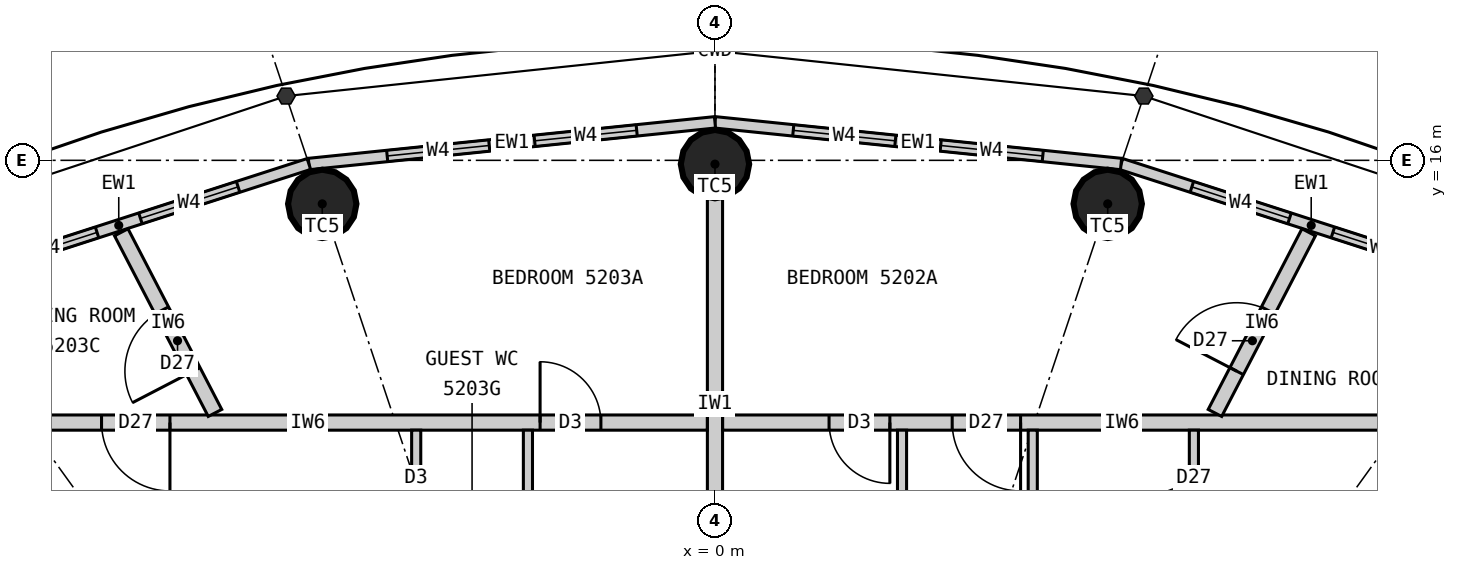
"""IFC4 building model, lengths in metres.
Left out: names, types, materials, properties, quantities, classifications, styles, units other than length and angle.
Written with IfcOpenShell. Run it as: python <this file> out.ifc"""

import sys

from ifc_helpers import new_model, si_unit, direction, frame, frame_2d, origin, origin_2d, place, context, subcontext, project, spatial, rectangle, circle, extrude, element, fill, save


model = new_model("IFC4")
c1 = context("Model", 3, precision=1e-05, world=origin(), true_north=direction((0.0, 1.0)))
c2 = subcontext(c1, "Body", "Model", "MODEL_VIEW")
j1 = project(units=[si_unit("LENGTHUNIT", "METRE"), si_unit("PLANEANGLEUNIT", "RADIAN")], contexts=[c1])
p1 = place(None, origin())
s1 = spatial("IfcSite", under=j1, at=p1, CompositionType="ELEMENT")
p2 = place(p1, origin())
s2 = spatial("IfcBuilding", under=s1, at=p2, CompositionType="ELEMENT")
p3 = place(p2, frame((0.0, 0.0, 196.2)))
s3 = spatial("IfcBuildingStorey", under=s2, at=p3, CompositionType="ELEMENT", Elevation=196.2)
for number, where, z_axis, x_axis in (
    (1, (5.167, 15.427, 0.0), (0.0, 0.0, 1.0), (1.0, 0.0, 0.0)),
    (2, (0.0, 15.95, 0.0), (0.0, 0.0, 1.0), (1.0, 0.0, 0.0)),
    (3, (-5.167, 15.427, 0.0), (0.0, 0.0, 1.0), (1.0, 0.0, 0.0)),
):
    element("IfcColumn", number, at=place(p3, frame(where, z_axis=z_axis, x_axis=x_axis)), inside=s3, PredefinedType="COLUMN", context=c2, shape_type="SweptSolid", body=[
        extrude(circle(Radius=0.45, at=origin_2d()), origin(), (0.0, 0.0, 1.0), 3.3),
    ])
p4 = place(p3, frame((10.346, 14.336, 0.0), z_axis=(0.0, 0.0, 1.0), x_axis=(-0.951644702515, 0.307200846638, 0.0)))
e4 = element("IfcWall", 4, at=p4, inside=s3, PredefinedType="ELEMENTEDWALL", context=c2, shape_type="SweptSolid", body=[
    extrude(rectangle(XDim=5.258, YDim=0.15, at=frame_2d((2.629, 0.0))), origin(), (0.0, 0.0, 1.0), 3.12),
])
p5 = place(p4, frame((0.979, 0.0, 0.9)))
e5 = element("IfcOpeningElement", 5, at=p5, cuts=e4, PredefinedType="OPENING", context=c2, shape_type="SweptSolid", body=[
    extrude(rectangle(XDim=1.35, YDim=1.9, at=frame_2d((0.675, 0.95))), frame((0.0, 0.085, 0.0), z_axis=(0.0, -1.0, 0.0), x_axis=(1.0, 0.0, 0.0)), (0.0, 0.0, 1.0), 0.17),
])
p6 = place(p4, frame((2.929, 0.0, 0.9)))
e6 = element("IfcOpeningElement", 6, at=p6, cuts=e4, PredefinedType="OPENING", context=c2, shape_type="SweptSolid", body=[
    extrude(rectangle(XDim=1.35, YDim=1.9, at=frame_2d((0.675, 0.95))), frame((0.0, 0.085, 0.0), z_axis=(0.0, -1.0, 0.0), x_axis=(1.0, 0.0, 0.0)), (0.0, 0.0, 1.0), 0.17),
])
p7 = place(p3, frame((5.343, 15.952, 0.0), z_axis=(0.0, 0.0, 1.0), x_axis=(-0.994774574972, 0.102095763818, 0.0)))
e7 = element("IfcWall", 7, at=p7, inside=s3, PredefinedType="ELEMENTEDWALL", context=c2, shape_type="SweptSolid", body=[
    extrude(rectangle(XDim=5.371, YDim=0.15, at=frame_2d((2.686, 0.0))), origin(), (0.0, 0.0, 1.0), 3.12),
])
p8 = place(p7, frame((1.035, 0.0, 0.9)))
e8 = element("IfcOpeningElement", 8, at=p8, cuts=e7, PredefinedType="OPENING", context=c2, shape_type="SweptSolid", body=[
    extrude(rectangle(XDim=1.35, YDim=1.9, at=frame_2d((0.675, 0.95))), frame((0.0, 0.085, 0.0), z_axis=(0.0, -1.0, 0.0), x_axis=(1.0, 0.0, 0.0)), (0.0, 0.0, 1.0), 0.17),
])
p9 = place(p7, frame((2.985, 0.0, 0.9)))
e9 = element("IfcOpeningElement", 9, at=p9, cuts=e7, PredefinedType="OPENING", context=c2, shape_type="SweptSolid", body=[
    extrude(rectangle(XDim=1.35, YDim=1.9, at=frame_2d((0.675, 0.95))), frame((0.0, 0.085, 0.0), z_axis=(0.0, -1.0, 0.0), x_axis=(1.0, 0.0, 0.0)), (0.0, 0.0, 1.0), 0.17),
])
p10 = place(p3, frame((0.0, 16.5, 0.0), z_axis=(0.0, 0.0, 1.0), x_axis=(-0.994774574972, -0.102095763818, 0.0)))
e10 = element("IfcWall", 10, at=p10, inside=s3, PredefinedType="ELEMENTEDWALL", context=c2, shape_type="SweptSolid", body=[
    extrude(rectangle(XDim=5.371, YDim=0.15, at=frame_2d((2.686, 0.0))), origin(), (0.0, 0.0, 1.0), 3.12),
])
p11 = place(p10, frame((1.035, 0.0, 0.9)))
e11 = element("IfcOpeningElement", 11, at=p11, cuts=e10, PredefinedType="OPENING", context=c2, shape_type="SweptSolid", body=[
    extrude(rectangle(XDim=1.35, YDim=1.9, at=frame_2d((0.675, 0.95))), frame((0.0, 0.085, 0.0), z_axis=(0.0, -1.0, 0.0), x_axis=(1.0, 0.0, 0.0)), (0.0, 0.0, 1.0), 0.17),
])
p12 = place(p10, frame((2.985, 0.0, 0.9)))
e12 = element("IfcOpeningElement", 12, at=p12, cuts=e10, PredefinedType="OPENING", context=c2, shape_type="SweptSolid", body=[
    extrude(rectangle(XDim=1.35, YDim=1.9, at=frame_2d((0.675, 0.95))), frame((0.0, 0.085, 0.0), z_axis=(0.0, -1.0, 0.0), x_axis=(1.0, 0.0, 0.0)), (0.0, 0.0, 1.0), 0.17),
])
p13 = place(p3, frame((-5.343, 15.952, 0.0), z_axis=(0.0, 0.0, 1.0), x_axis=(-0.951644702515, -0.307200846638, 0.0)))
e13 = element("IfcWall", 13, at=p13, inside=s3, PredefinedType="ELEMENTEDWALL", context=c2, shape_type="SweptSolid", body=[
    extrude(rectangle(XDim=5.258, YDim=0.15, at=frame_2d((2.629, 0.0))), origin(), (0.0, 0.0, 1.0), 3.12),
])
p14 = place(p13, frame((0.979, 0.0, 0.9)))
e14 = element("IfcOpeningElement", 14, at=p14, cuts=e13, PredefinedType="OPENING", context=c2, shape_type="SweptSolid", body=[
    extrude(rectangle(XDim=1.35, YDim=1.9, at=frame_2d((0.675, 0.95))), frame((0.0, 0.085, 0.0), z_axis=(0.0, -1.0, 0.0), x_axis=(1.0, 0.0, 0.0)), (0.0, 0.0, 1.0), 0.17),
])
p15 = place(p13, frame((2.929, 0.0, 0.9)))
e15 = element("IfcOpeningElement", 15, at=p15, cuts=e13, PredefinedType="OPENING", context=c2, shape_type="SweptSolid", body=[
    extrude(rectangle(XDim=1.35, YDim=1.9, at=frame_2d((0.675, 0.95))), frame((0.0, 0.085, 0.0), z_axis=(0.0, -1.0, 0.0), x_axis=(1.0, 0.0, 0.0)), (0.0, 0.0, 1.0), 0.17),
])
p16 = place(p3, frame((0.0, 10.1, 0.0), z_axis=(0.0, 0.0, 1.0), x_axis=(0.0, 1.0, 0.0)))
e16 = element("IfcWall", 16, at=p16, inside=s3, PredefinedType="PARTITIONING", context=c2, shape_type="SweptSolid", body=[
    extrude(rectangle(XDim=5.4, YDim=0.2, at=frame_2d((2.7, 0.0))), origin(), (0.0, 0.0, 1.0), 2.42),
])
p17 = place(p3, frame((10.609, 12.55, 0.0), z_axis=(0.0, 0.0, 1.0), x_axis=(-1.0, 0.0, 0.0)))
e17 = element("IfcWall", 17, at=p17, inside=s3, PredefinedType="PARTITIONING", context=c2, shape_type="SweptSolid", body=[
    extrude(rectangle(XDim=10.508, YDim=0.2, at=frame_2d((5.254, 0.0))), origin(), (0.0, 0.0, 1.0), 3.12),
])
p18 = place(p17, frame((6.588, 0.0, 0.0)))
e18 = element("IfcOpeningElement", 18, at=p18, cuts=e17, PredefinedType="OPENING", context=c2, shape_type="SweptSolid", body=[
    extrude(rectangle(XDim=0.9, YDim=2.1, at=frame_2d((0.45, 1.05))), frame((0.0, 0.11, 0.0), z_axis=(0.0, -1.0, 0.0), x_axis=(1.0, 0.0, 0.0)), (0.0, 0.0, 1.0), 0.22),
])
p19 = place(p17, frame((8.308, 0.0, 0.0)))
e19 = element("IfcOpeningElement", 19, at=p19, cuts=e17, PredefinedType="OPENING", context=c2, shape_type="SweptSolid", body=[
    extrude(rectangle(XDim=0.8, YDim=2.1, at=frame_2d((0.4, 1.05))), frame((0.0, 0.11, 0.0), z_axis=(0.0, -1.0, 0.0), x_axis=(1.0, 0.0, 0.0)), (0.0, 0.0, 1.0), 0.22),
])
p20 = place(p3, frame((6.578, 12.677, 0.0), z_axis=(0.0, 0.0, 1.0), x_axis=(0.460620531465, 0.887597164255, 0.0)))
e20 = element("IfcWall", 20, at=p20, inside=s3, PredefinedType="PARTITIONING", context=c2, shape_type="SweptSolid", body=[
    extrude(rectangle(XDim=2.678, YDim=0.2, at=frame_2d((1.339, 0.0))), origin(), (0.0, 0.0, 1.0), 3.12),
])
p21 = place(p20, frame((0.62, 0.0, 0.0)))
e21 = element("IfcOpeningElement", 21, at=p21, cuts=e20, PredefinedType="OPENING", context=c2, shape_type="SweptSolid", body=[
    extrude(rectangle(XDim=0.9, YDim=2.1, at=frame_2d((0.45, 1.05))), frame((0.0, 0.11, 0.0), z_axis=(0.0, -1.0, 0.0), x_axis=(1.0, 0.0, 0.0)), (0.0, 0.0, 1.0), 0.22),
])
p22 = place(p3, frame((6.301, 10.1, 0.0), z_axis=(0.0, 0.0, 1.0), x_axis=(0.0, 1.0, 0.0)))
e22 = element("IfcWall", 22, at=p22, inside=s3, PredefinedType="PARTITIONING", context=c2, shape_type="SweptSolid", body=[
    extrude(rectangle(XDim=2.35, YDim=0.12, at=frame_2d((1.175, 0.0))), origin(), (0.0, 0.0, 1.0), 3.12),
])
p23 = place(p22, frame((0.72, 0.0, 0.0)))
e23 = element("IfcOpeningElement", 23, at=p23, cuts=e22, PredefinedType="OPENING", context=c2, shape_type="SweptSolid", body=[
    extrude(rectangle(XDim=0.9, YDim=2.1, at=frame_2d((0.45, 1.05))), frame((0.0, 0.07, 0.0), z_axis=(0.0, -1.0, 0.0), x_axis=(1.0, 0.0, 0.0)), (0.0, 0.0, 1.0), 0.14),
])
for number, where, z_axis, x_axis in (
    (24, (4.181, 10.1, 0.0), (0.0, 0.0, 1.0), (0.0, 1.0, 0.0)),
    (25, (2.461, 10.1, 0.0), (0.0, 0.0, 1.0), (0.0, 1.0, 0.0)),
):
    element("IfcWall", number, at=place(p3, frame(where, z_axis=z_axis, x_axis=x_axis)), inside=s3, PredefinedType="PARTITIONING", context=c2, shape_type="SweptSolid", body=[
        extrude(rectangle(XDim=2.35, YDim=0.12, at=frame_2d((1.175, 0.0))), origin(), (0.0, 0.0, 1.0), 3.12),
    ])
p24 = place(p3, frame((-0.101, 12.55, 0.0), z_axis=(0.0, 0.0, 1.0), x_axis=(-1.0, 0.0, 0.0)))
e26 = element("IfcWall", 26, at=p24, inside=s3, PredefinedType="PARTITIONING", context=c2, shape_type="SweptSolid", body=[
    extrude(rectangle(XDim=10.508, YDim=0.2, at=frame_2d((5.254, 0.0))), origin(), (0.0, 0.0, 1.0), 3.12),
])
p25 = place(p24, frame((1.4, 0.0, 0.0)))
e27 = element("IfcOpeningElement", 27, at=p25, cuts=e26, PredefinedType="OPENING", context=c2, shape_type="SweptSolid", body=[
    extrude(rectangle(XDim=0.8, YDim=2.1, at=frame_2d((0.4, 1.05))), frame((0.0, 0.11, 0.0), z_axis=(0.0, -1.0, 0.0), x_axis=(1.0, 0.0, 0.0)), (0.0, 0.0, 1.0), 0.22),
])
p26 = place(p24, frame((7.07, 0.0, 0.0)))
e28 = element("IfcOpeningElement", 28, at=p26, cuts=e26, PredefinedType="OPENING", context=c2, shape_type="SweptSolid", body=[
    extrude(rectangle(XDim=0.9, YDim=2.1, at=frame_2d((0.45, 1.05))), frame((0.0, 0.11, 0.0), z_axis=(0.0, -1.0, 0.0), x_axis=(1.0, 0.0, 0.0)), (0.0, 0.0, 1.0), 0.22),
])
p27 = place(p3, frame((-6.578, 12.677, 0.0), z_axis=(0.0, 0.0, 1.0), x_axis=(-0.460620531465, 0.887597164255, 0.0)))
e29 = element("IfcWall", 29, at=p27, inside=s3, PredefinedType="PARTITIONING", context=c2, shape_type="SweptSolid", body=[
    extrude(rectangle(XDim=2.678, YDim=0.2, at=frame_2d((1.339, 0.0))), origin(), (0.0, 0.0, 1.0), 3.12),
])
p28 = place(p27, frame((0.62, 0.0, 0.0)))
e30 = element("IfcOpeningElement", 30, at=p28, cuts=e29, PredefinedType="OPENING", context=c2, shape_type="SweptSolid", body=[
    extrude(rectangle(XDim=0.9, YDim=2.1, at=frame_2d((0.45, 1.05))), frame((0.0, 0.11, 0.0), z_axis=(0.0, -1.0, 0.0), x_axis=(1.0, 0.0, 0.0)), (0.0, 0.0, 1.0), 0.22),
])
p29 = place(p3, frame((-2.461, 10.1, 0.0), z_axis=(0.0, 0.0, 1.0), x_axis=(0.0, 1.0, 0.0)))
e31 = element("IfcWall", 31, at=p29, inside=s3, PredefinedType="PARTITIONING", context=c2, shape_type="SweptSolid", body=[
    extrude(rectangle(XDim=2.35, YDim=0.12, at=frame_2d((1.175, 0.0))), origin(), (0.0, 0.0, 1.0), 3.12),
])
p30 = place(p3, frame((-3.931, 10.1, 0.0), z_axis=(0.0, 0.0, 1.0), x_axis=(0.0, 1.0, 0.0)))
e32 = element("IfcWall", 32, at=p30, inside=s3, PredefinedType="PARTITIONING", context=c2, shape_type="SweptSolid", body=[
    extrude(rectangle(XDim=2.35, YDim=0.12, at=frame_2d((1.175, 0.0))), origin(), (0.0, 0.0, 1.0), 3.12),
])
p31 = place(p30, frame((0.77, 0.0, 0.0)))
e33 = element("IfcOpeningElement", 33, at=p31, cuts=e32, PredefinedType="OPENING", context=c2, shape_type="SweptSolid", body=[
    extrude(rectangle(XDim=0.8, YDim=2.1, at=frame_2d((0.4, 1.05))), frame((0.0, 0.07, 0.0), z_axis=(0.0, -1.0, 0.0), x_axis=(1.0, 0.0, 0.0)), (0.0, 0.0, 1.0), 0.14),
])
p32 = place(p5, origin())
e34 = element("IfcWindow", 34, at=p32, inside=s3, PartitioningType="SINGLE_PANEL", PredefinedType="WINDOW", context=c2, shape_type="SweptSolid", body=[
    extrude(rectangle(XDim=1.35, YDim=1.9, at=frame_2d((0.675, 0.95))), frame((0.0, 0.03, 0.0), z_axis=(0.0, -1.0, 0.0), x_axis=(1.0, 0.0, 0.0)), (0.0, 0.0, 1.0), 0.06),
])
fill(e5, e34)
p33 = place(p6, origin())
e35 = element("IfcWindow", 35, at=p33, inside=s3, PartitioningType="SINGLE_PANEL", PredefinedType="WINDOW", context=c2, shape_type="SweptSolid", body=[
    extrude(rectangle(XDim=1.35, YDim=1.9, at=frame_2d((0.675, 0.95))), frame((0.0, 0.03, 0.0), z_axis=(0.0, -1.0, 0.0), x_axis=(1.0, 0.0, 0.0)), (0.0, 0.0, 1.0), 0.06),
])
fill(e6, e35)
p34 = place(p8, origin())
e36 = element("IfcWindow", 36, at=p34, inside=s3, PartitioningType="SINGLE_PANEL", PredefinedType="WINDOW", context=c2, shape_type="SweptSolid", body=[
    extrude(rectangle(XDim=1.35, YDim=1.9, at=frame_2d((0.675, 0.95))), frame((0.0, 0.03, 0.0), z_axis=(0.0, -1.0, 0.0), x_axis=(1.0, 0.0, 0.0)), (0.0, 0.0, 1.0), 0.06),
])
fill(e8, e36)
p35 = place(p9, origin())
e37 = element("IfcWindow", 37, at=p35, inside=s3, PartitioningType="SINGLE_PANEL", PredefinedType="WINDOW", context=c2, shape_type="SweptSolid", body=[
    extrude(rectangle(XDim=1.35, YDim=1.9, at=frame_2d((0.675, 0.95))), frame((0.0, 0.03, 0.0), z_axis=(0.0, -1.0, 0.0), x_axis=(1.0, 0.0, 0.0)), (0.0, 0.0, 1.0), 0.06),
])
fill(e9, e37)
p36 = place(p11, origin())
e38 = element("IfcWindow", 38, at=p36, inside=s3, PartitioningType="SINGLE_PANEL", PredefinedType="WINDOW", context=c2, shape_type="SweptSolid", body=[
    extrude(rectangle(XDim=1.35, YDim=1.9, at=frame_2d((0.675, 0.95))), frame((0.0, 0.03, 0.0), z_axis=(0.0, -1.0, 0.0), x_axis=(1.0, 0.0, 0.0)), (0.0, 0.0, 1.0), 0.06),
])
fill(e11, e38)
p37 = place(p12, origin())
e39 = element("IfcWindow", 39, at=p37, inside=s3, PartitioningType="SINGLE_PANEL", PredefinedType="WINDOW", context=c2, shape_type="SweptSolid", body=[
    extrude(rectangle(XDim=1.35, YDim=1.9, at=frame_2d((0.675, 0.95))), frame((0.0, 0.03, 0.0), z_axis=(0.0, -1.0, 0.0), x_axis=(1.0, 0.0, 0.0)), (0.0, 0.0, 1.0), 0.06),
])
fill(e12, e39)
p38 = place(p14, origin())
e40 = element("IfcWindow", 40, at=p38, inside=s3, PartitioningType="SINGLE_PANEL", PredefinedType="WINDOW", context=c2, shape_type="SweptSolid", body=[
    extrude(rectangle(XDim=1.35, YDim=1.9, at=frame_2d((0.675, 0.95))), frame((0.0, 0.03, 0.0), z_axis=(0.0, -1.0, 0.0), x_axis=(1.0, 0.0, 0.0)), (0.0, 0.0, 1.0), 0.06),
])
fill(e14, e40)
p39 = place(p15, origin())
e41 = element("IfcWindow", 41, at=p39, inside=s3, PartitioningType="SINGLE_PANEL", PredefinedType="WINDOW", context=c2, shape_type="SweptSolid", body=[
    extrude(rectangle(XDim=1.35, YDim=1.9, at=frame_2d((0.675, 0.95))), frame((0.0, 0.03, 0.0), z_axis=(0.0, -1.0, 0.0), x_axis=(1.0, 0.0, 0.0)), (0.0, 0.0, 1.0), 0.06),
])
fill(e15, e41)
p40 = place(p23, origin())
e42 = element("IfcDoor", 42, at=p40, inside=s3, OperationType="SINGLE_SWING_LEFT", PredefinedType="DOOR", context=c2, shape_type="SweptSolid", body=[
    extrude(rectangle(XDim=0.9, YDim=2.1, at=frame_2d((0.45, 1.05))), frame((0.0, 0.025, 0.0), z_axis=(0.0, -1.0, 0.0), x_axis=(1.0, 0.0, 0.0)), (0.0, 0.0, 1.0), 0.05),
])
fill(e23, e42)
p41 = place(p18, origin())
e43 = element("IfcDoor", 43, at=p41, inside=s3, OperationType="SINGLE_SWING_LEFT", PredefinedType="DOOR", context=c2, shape_type="SweptSolid", body=[
    extrude(rectangle(XDim=0.9, YDim=2.1, at=frame_2d((0.45, 1.05))), frame((0.0, 0.025, 0.0), z_axis=(0.0, -1.0, 0.0), x_axis=(1.0, 0.0, 0.0)), (0.0, 0.0, 1.0), 0.05),
])
fill(e18, e43)
p42 = place(p19, origin())
e44 = element("IfcDoor", 44, at=p42, inside=s3, OperationType="SINGLE_SWING_LEFT", PredefinedType="DOOR", context=c2, shape_type="SweptSolid", body=[
    extrude(rectangle(XDim=0.8, YDim=2.1, at=frame_2d((0.4, 1.05))), frame((0.0, 0.025, 0.0), z_axis=(0.0, -1.0, 0.0), x_axis=(1.0, 0.0, 0.0)), (0.0, 0.0, 1.0), 0.05),
])
fill(e19, e44)
p43 = place(p21, origin())
e45 = element("IfcDoor", 45, at=p43, inside=s3, OperationType="SINGLE_SWING_LEFT", PredefinedType="DOOR", context=c2, shape_type="SweptSolid", body=[
    extrude(rectangle(XDim=0.9, YDim=2.1, at=frame_2d((0.45, 1.05))), frame((0.0, 0.025, 0.0), z_axis=(0.0, -1.0, 0.0), x_axis=(1.0, 0.0, 0.0)), (0.0, 0.0, 1.0), 0.05),
])
fill(e21, e45)
p44 = place(p25, origin())
e46 = element("IfcDoor", 46, at=p44, inside=s3, OperationType="SINGLE_SWING_RIGHT", PredefinedType="DOOR", context=c2, shape_type="SweptSolid", body=[
    extrude(rectangle(XDim=0.8, YDim=2.1, at=frame_2d((0.4, 1.05))), frame((0.0, 0.025, 0.0), z_axis=(0.0, -1.0, 0.0), x_axis=(1.0, 0.0, 0.0)), (0.0, 0.0, 1.0), 0.05),
])
fill(e27, e46)
p45 = place(p31, origin())
e47 = element("IfcDoor", 47, at=p45, inside=s3, OperationType="SINGLE_SWING_LEFT", PredefinedType="DOOR", context=c2, shape_type="SweptSolid", body=[
    extrude(rectangle(XDim=0.8, YDim=2.1, at=frame_2d((0.4, 1.05))), frame((0.0, 0.025, 0.0), z_axis=(0.0, -1.0, 0.0), x_axis=(1.0, 0.0, 0.0)), (0.0, 0.0, 1.0), 0.05),
])
fill(e33, e47)
p46 = place(p26, origin())
e48 = element("IfcDoor", 48, at=p46, inside=s3, OperationType="SINGLE_SWING_LEFT", PredefinedType="DOOR", context=c2, shape_type="SweptSolid", body=[
    extrude(rectangle(XDim=0.9, YDim=2.1, at=frame_2d((0.45, 1.05))), frame((0.0, 0.025, 0.0), z_axis=(0.0, -1.0, 0.0), x_axis=(1.0, 0.0, 0.0)), (0.0, 0.0, 1.0), 0.05),
])
fill(e28, e48)
p47 = place(p28, origin())
e49 = element("IfcDoor", 49, at=p47, inside=s3, OperationType="SINGLE_SWING_LEFT", PredefinedType="DOOR", context=c2, shape_type="SweptSolid", body=[
    extrude(rectangle(XDim=0.9, YDim=2.1, at=frame_2d((0.45, 1.05))), frame((0.0, 0.025, 0.0), z_axis=(0.0, -1.0, 0.0), x_axis=(1.0, 0.0, 0.0)), (0.0, 0.0, 1.0), 0.05),
])
fill(e30, e49)
save(model, sys.argv[1])
